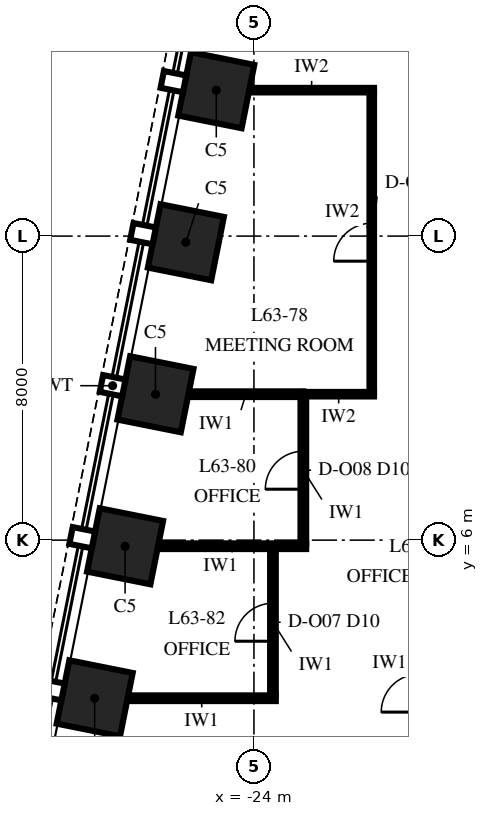
"""IFC4 building model, lengths in metres.
Left out: names, types, materials, properties, quantities, classifications, styles, units other than length and angle.
Written with IfcOpenShell. Run it as: python <this file> out.ifc"""

import sys

from ifc_helpers import new_model, si_unit, direction, frame, frame_2d, origin, origin_2d, place, context, subcontext, project, spatial, rectangle, extrude, element, fill, save


model = new_model("IFC4")
c1 = context("Model", 3, precision=1e-05, world=origin(), true_north=direction((0.0, 1.0)))
c2 = subcontext(c1, "Body", "Model", "MODEL_VIEW")
j1 = project(units=[si_unit("LENGTHUNIT", "METRE"), si_unit("PLANEANGLEUNIT", "RADIAN")], contexts=[c1])
p1 = place(None, origin())
s1 = spatial("IfcSite", under=j1, at=p1, CompositionType="ELEMENT")
p2 = place(p1, origin())
s2 = spatial("IfcBuilding", under=s1, at=p2, CompositionType="ELEMENT")
p3 = place(p2, frame((0.0, 0.0, 272.0)))
s3 = spatial("IfcBuildingStorey", under=s2, at=p3, CompositionType="ELEMENT", Elevation=272.0)
for number, where, z_axis, x_axis in (
    (1, (-24.991, 17.838, 0.0), (0.0, 0.0, 1.0), (-0.196, -0.981, 0.0)),
    (2, (-25.791, 13.838, 0.0), (0.0, 0.0, 1.0), (-0.196, -0.981, 0.0)),
    (3, (-26.591, 9.838, 0.0), (0.0, 0.0, 1.0), (-0.196, -0.981, 0.0)),
    (4, (-27.391, 5.838, 0.0), (0.0, 0.0, 1.0), (-0.196, -0.981, 0.0)),
    (5, (-28.191, 1.838, 0.0), (0.0, 0.0, 1.0), (-0.196, -0.981, 0.0)),
):
    element("IfcColumn", number, at=place(p3, frame(where, z_axis=z_axis, x_axis=x_axis)), inside=s3, PredefinedType="COLUMN", context=c2, shape_type="SweptSolid", body=[
        extrude(rectangle(XDim=1.7, YDim=1.7, at=origin_2d()), origin(), (0.0, 0.0, 1.0), 4.0),
    ])
p4 = place(p3, frame((-27.324, 1.84, 0.0), z_axis=(0.0, 0.0, 1.0), x_axis=(1.0, 0.0, 0.0)))
e6 = element("IfcWall", 6, at=p4, inside=s3, PredefinedType="PARTITIONING", context=c2, shape_type="SweptSolid", body=[
    extrude(rectangle(XDim=3.899, YDim=0.15, at=frame_2d((1.949, 0.0))), origin(), (0.0, 0.0, 1.0), 3.23),
])
p5 = place(p3, frame((-26.524, 5.84, 0.0), z_axis=(0.0, 0.0, 1.0), x_axis=(1.0, 0.0, 0.0)))
e7 = element("IfcWall", 7, at=p5, inside=s3, PredefinedType="PARTITIONING", context=c2, shape_type="SweptSolid", body=[
    extrude(rectangle(XDim=3.899, YDim=0.15, at=frame_2d((1.949, 0.0))), origin(), (0.0, 0.0, 1.0), 2.842),
])
p6 = place(p3, frame((-25.724, 9.84, 0.0), z_axis=(0.0, 0.0, 1.0), x_axis=(1.0, 0.0, 0.0)))
e8 = element("IfcWall", 8, at=p6, inside=s3, PredefinedType="PARTITIONING", context=c2, shape_type="SweptSolid", body=[
    extrude(rectangle(XDim=3.024, YDim=0.15, at=frame_2d((1.512, 0.0))), origin(), (0.0, 0.0, 1.0), 3.23),
])
p7 = place(p3, frame((-22.7, 9.84, 0.0), z_axis=(0.0, 0.0, 1.0), x_axis=(1.0, 0.0, 0.0)))
e9 = element("IfcWall", 9, at=p7, inside=s3, PredefinedType="PARTITIONING", context=c2, shape_type="SweptSolid", body=[
    extrude(rectangle(XDim=1.86, YDim=0.12, at=frame_2d((0.93, 0.0))), origin(), (0.0, 0.0, 1.0), 3.85),
])
p8 = place(p3, frame((-24.124, 17.84, 0.0), z_axis=(0.0, 0.0, 1.0), x_axis=(1.0, 0.0, 0.0)))
e10 = element("IfcWall", 10, at=p8, inside=s3, PredefinedType="PARTITIONING", context=c2, shape_type="SweptSolid", body=[
    extrude(rectangle(XDim=3.284, YDim=0.12, at=frame_2d((1.642, 0.0))), origin(), (0.0, 0.0, 1.0), 3.23),
])
p9 = place(p3, frame((-23.5, 1.915, 0.0), z_axis=(0.0, 0.0, 1.0), x_axis=(0.0, 1.0, 0.0)))
e11 = element("IfcWall", 11, at=p9, inside=s3, PredefinedType="PARTITIONING", context=c2, shape_type="SweptSolid", body=[
    extrude(rectangle(XDim=3.85, YDim=0.15, at=frame_2d((1.925, 0.0))), origin(), (0.0, 0.0, 1.0), 3.85),
])
p10 = place(p9, frame((1.425, 0.0, 0.0)))
e12 = element("IfcOpeningElement", 12, at=p10, cuts=e11, PredefinedType="OPENING", context=c2, shape_type="SweptSolid", body=[
    extrude(rectangle(XDim=1.0, YDim=2.3, at=frame_2d((0.5, 1.15))), frame((0.0, 0.09, 0.0), z_axis=(0.0, -1.0, 0.0), x_axis=(1.0, 0.0, 0.0)), (0.0, 0.0, 1.0), 0.18),
])
p11 = place(p3, frame((-22.7, 5.915, 0.0), z_axis=(0.0, 0.0, 1.0), x_axis=(0.0, 1.0, 0.0)))
e13 = element("IfcWall", 13, at=p11, inside=s3, PredefinedType="PARTITIONING", context=c2, shape_type="SweptSolid", body=[
    extrude(rectangle(XDim=3.85, YDim=0.15, at=frame_2d((1.925, 0.0))), origin(), (0.0, 0.0, 1.0), 2.842),
])
p12 = place(p11, frame((1.425, 0.0, 0.0)))
e14 = element("IfcOpeningElement", 14, at=p12, cuts=e13, PredefinedType="OPENING", context=c2, shape_type="SweptSolid", body=[
    extrude(rectangle(XDim=1.0, YDim=2.3, at=frame_2d((0.5, 1.15))), frame((0.0, 0.09, 0.0), z_axis=(0.0, -1.0, 0.0), x_axis=(1.0, 0.0, 0.0)), (0.0, 0.0, 1.0), 0.18),
])
p13 = place(p3, frame((-20.9, 9.9, 0.0), z_axis=(0.0, 0.0, 1.0), x_axis=(0.0, 1.0, 0.0)))
e15 = element("IfcWall", 15, at=p13, inside=s3, PredefinedType="PARTITIONING", context=c2, shape_type="SweptSolid", body=[
    extrude(rectangle(XDim=7.88, YDim=0.12, at=frame_2d((3.94, 0.0))), origin(), (0.0, 0.0, 1.0), 3.23),
])
p14 = place(p13, frame((3.44, 0.0, 0.0)))
e16 = element("IfcOpeningElement", 16, at=p14, cuts=e15, PredefinedType="OPENING", context=c2, shape_type="SweptSolid", body=[
    extrude(rectangle(XDim=1.0, YDim=2.4, at=frame_2d((0.5, 1.2))), frame((0.0, 0.075, 0.0), z_axis=(0.0, -1.0, 0.0), x_axis=(1.0, 0.0, 0.0)), (0.0, 0.0, 1.0), 0.15),
])
p15 = place(p10, origin())
e17 = element("IfcDoor", 17, at=p15, inside=s3, OperationType="SINGLE_SWING_LEFT", PredefinedType="DOOR", context=c2, shape_type="SweptSolid", body=[
    extrude(rectangle(XDim=1.0, YDim=2.3, at=frame_2d((0.5, 1.15))), frame((0.0, 0.075, 0.0), z_axis=(0.0, -1.0, 0.0), x_axis=(1.0, 0.0, 0.0)), (0.0, 0.0, 1.0), 0.149),
])
fill(e12, e17)
p16 = place(p12, origin())
e18 = element("IfcDoor", 18, at=p16, inside=s3, OperationType="SINGLE_SWING_LEFT", PredefinedType="DOOR", context=c2, shape_type="SweptSolid", body=[
    extrude(rectangle(XDim=1.0, YDim=2.3, at=frame_2d((0.5, 1.15))), frame((0.0, 0.075, 0.0), z_axis=(0.0, -1.0, 0.0), x_axis=(1.0, 0.0, 0.0)), (0.0, 0.0, 1.0), 0.149),
])
fill(e14, e18)
p17 = place(p14, origin())
e19 = element("IfcDoor", 19, at=p17, inside=s3, OperationType="SINGLE_SWING_RIGHT", PredefinedType="DOOR", context=c2, shape_type="SweptSolid", body=[
    extrude(rectangle(XDim=1.0, YDim=2.4, at=frame_2d((0.5, 1.2))), frame((0.0, 0.06, 0.0), z_axis=(0.0, -1.0, 0.0), x_axis=(1.0, 0.0, 0.0)), (0.0, 0.0, 1.0), 0.12),
])
fill(e16, e19)
save(model, sys.argv[1])
